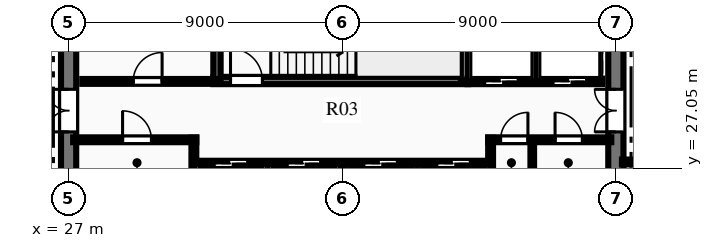
"""IFC4 building model, lengths in metres.
Left out: names, types, materials, properties, quantities, classifications, styles, units other than length and angle.
Written with IfcOpenShell. Run it as: python <this file> out.ifc"""

import sys

from ifc_helpers import new_model, si_unit, direction, frame, frame_2d, origin, place, context, subcontext, project, spatial, rectangle, extrude, element, fill, save


model = new_model("IFC4")
c1 = context("Model", 3, precision=1e-05, world=origin(), true_north=direction((0.0, 1.0)))
c2 = subcontext(c1, "Body", "Model", "MODEL_VIEW")
j1 = project(units=[si_unit("LENGTHUNIT", "METRE"), si_unit("PLANEANGLEUNIT", "RADIAN")], contexts=[c1])
p1 = place(None, origin())
s1 = spatial("IfcSite", under=j1, at=p1, CompositionType="ELEMENT")
p2 = place(p1, origin())
s2 = spatial("IfcBuilding", under=s1, at=p2, CompositionType="ELEMENT")
p3 = place(p2, frame((0.0, 0.0, 174.45)))
s3 = spatial("IfcBuildingStorey", under=s2, at=p3, CompositionType="ELEMENT", Elevation=174.45)
p4 = place(p3, frame((27.0, 18.25, 0.0), z_axis=(0.0, 0.0, 1.0), x_axis=(0.0, 1.0, 0.0)))
e1 = element("IfcWall", 1, at=p4, inside=s3, PredefinedType="SHEAR", context=c2, shape_type="SweptSolid", body=[
    extrude(rectangle(XDim=15.5, YDim=0.5, at=frame_2d((7.75, 0.0))), origin(), (0.0, 0.0, 1.0), 3.75),
])
p5 = place(p4, frame((9.99, 0.0, 0.0)))
e2 = element("IfcOpeningElement", 2, at=p5, cuts=e1, PredefinedType="OPENING", context=c2, shape_type="SweptSolid", body=[
    extrude(rectangle(XDim=1.4, YDim=2.2, at=frame_2d((0.7, 1.1))), frame((0.0, 0.26, 0.0), z_axis=(0.0, -1.0, 0.0), x_axis=(1.0, 0.0, 0.0)), (0.0, 0.0, 1.0), 0.52),
])
p6 = place(p3, frame((45.0, 18.25, 0.0), z_axis=(0.0, 0.0, 1.0), x_axis=(0.0, 1.0, 0.0)))
e3 = element("IfcWall", 3, at=p6, inside=s3, PredefinedType="SHEAR", context=c2, shape_type="SweptSolid", body=[
    extrude(rectangle(XDim=15.5, YDim=0.5, at=frame_2d((7.75, 0.0))), origin(), (0.0, 0.0, 1.0), 3.75),
])
p7 = place(p6, frame((9.99, 0.0, 0.0)))
e4 = element("IfcOpeningElement", 4, at=p7, cuts=e3, PredefinedType="OPENING", context=c2, shape_type="SweptSolid", body=[
    extrude(rectangle(XDim=1.4, YDim=2.2, at=frame_2d((0.7, 1.1))), frame((0.0, 0.26, 0.0), z_axis=(0.0, -1.0, 0.0), x_axis=(1.0, 0.0, 0.0)), (0.0, 0.0, 1.0), 0.52),
])
p8 = place(p3, frame((31.76, 29.93, 0.0), z_axis=(0.0, 0.0, 1.0), x_axis=(1.0, 0.0, 0.0)))
e5 = element("IfcWall", 5, at=p8, inside=s3, PredefinedType="SHEAR", context=c2, shape_type="SweptSolid", body=[
    extrude(rectangle(XDim=8.38, YDim=0.24, at=frame_2d((4.19, 0.0))), origin(), (0.0, 0.0, 1.0), 3.75),
])
p9 = place(p8, frame((0.565, 0.0, 0.0)))
e6 = element("IfcOpeningElement", 6, at=p9, cuts=e5, PredefinedType="OPENING", context=c2, shape_type="SweptSolid", body=[
    extrude(rectangle(XDim=1.05, YDim=2.15, at=frame_2d((0.525, 1.075))), frame((0.0, 0.13, 0.0), z_axis=(0.0, -1.0, 0.0), x_axis=(1.0, 0.0, 0.0)), (0.0, 0.0, 1.0), 0.26),
])
p10 = place(p3, frame((31.88, 29.93, 0.0), z_axis=(0.0, 0.0, 1.0), x_axis=(0.0, 1.0, 0.0)))
e7 = element("IfcWall", 7, at=p10, inside=s3, PredefinedType="SHEAR", context=c2, shape_type="SweptSolid", body=[
    extrude(rectangle(XDim=3.79, YDim=0.24, at=frame_2d((1.895, 0.0))), origin(), (0.0, 0.0, 1.0), 3.75),
])
p11 = place(p3, frame((40.02, 29.93, 0.0), z_axis=(0.0, 0.0, 1.0), x_axis=(0.0, 1.0, 0.0)))
e8 = element("IfcWall", 8, at=p11, inside=s3, PredefinedType="SHEAR", context=c2, shape_type="SweptSolid", body=[
    extrude(rectangle(XDim=3.85, YDim=0.24, at=frame_2d((1.925, 0.0))), origin(), (0.0, 0.0, 1.0), 3.75),
])
p12 = place(p3, frame((27.15, 27.98, 0.0), z_axis=(0.0, 0.0, 1.0), x_axis=(1.0, 0.0, 0.0)))
e9 = element("IfcWall", 9, at=p12, inside=s3, PredefinedType="PARTITIONING", context=c2, shape_type="SweptSolid", body=[
    extrude(rectangle(XDim=4.05, YDim=0.16, at=frame_2d((2.025, 0.0))), origin(), (0.0, 0.0, 1.0), 3.46),
])
p13 = place(p12, frame((1.625, 0.0, 0.0)))
e10 = element("IfcOpeningElement", 10, at=p13, cuts=e9, PredefinedType="OPENING", context=c2, shape_type="SweptSolid", body=[
    extrude(rectangle(XDim=0.95, YDim=2.15, at=frame_2d((0.475, 1.075))), frame((0.0, 0.09, 0.0), z_axis=(0.0, -1.0, 0.0), x_axis=(1.0, 0.0, 0.0)), (0.0, 0.0, 1.0), 0.18),
])
p14 = place(p3, frame((31.12, 26.54, 0.0), z_axis=(0.0, 0.0, 1.0), x_axis=(0.0, 1.0, 0.0)))
e11 = element("IfcWall", 11, at=p14, inside=s3, PredefinedType="PARTITIONING", context=c2, shape_type="SweptSolid", body=[
    extrude(rectangle(XDim=1.51, YDim=0.16, at=frame_2d((0.755, 0.0))), origin(), (0.0, 0.0, 1.0), 3.46),
])
p15 = place(p3, frame((40.8, 27.98, 0.0), z_axis=(0.0, 0.0, 1.0), x_axis=(1.0, 0.0, 0.0)))
e12 = element("IfcWall", 12, at=p15, inside=s3, PredefinedType="PARTITIONING", context=c2, shape_type="SweptSolid", body=[
    extrude(rectangle(XDim=4.05, YDim=0.16, at=frame_2d((2.025, 0.0))), origin(), (0.0, 0.0, 1.0), 3.46),
])
p16 = place(p15, frame((0.407, 0.0, 0.0)))
e13 = element("IfcOpeningElement", 13, at=p16, cuts=e12, PredefinedType="OPENING", context=c2, shape_type="SweptSolid", body=[
    extrude(rectangle(XDim=0.9, YDim=2.15, at=frame_2d((0.45, 1.075))), frame((0.0, 0.09, 0.0), z_axis=(0.0, -1.0, 0.0), x_axis=(1.0, 0.0, 0.0)), (0.0, 0.0, 1.0), 0.18),
])
p17 = place(p15, frame((2.2, 0.0, 0.0)))
e14 = element("IfcOpeningElement", 14, at=p17, cuts=e12, PredefinedType="OPENING", context=c2, shape_type="SweptSolid", body=[
    extrude(rectangle(XDim=0.9, YDim=2.15, at=frame_2d((0.45, 1.075))), frame((0.0, 0.09, 0.0), z_axis=(0.0, -1.0, 0.0), x_axis=(1.0, 0.0, 0.0)), (0.0, 0.0, 1.0), 0.18),
])
p18 = place(p3, frame((40.88, 26.54, 0.0), z_axis=(0.0, 0.0, 1.0), x_axis=(0.0, 1.0, 0.0)))
e15 = element("IfcWall", 15, at=p18, inside=s3, PredefinedType="PARTITIONING", context=c2, shape_type="SweptSolid", body=[
    extrude(rectangle(XDim=1.51, YDim=0.16, at=frame_2d((0.755, 0.0))), origin(), (0.0, 0.0, 1.0), 3.46),
])
p19 = place(p3, frame((42.25, 26.54, 0.0), z_axis=(0.0, 0.0, 1.0), x_axis=(0.0, 1.0, 0.0)))
e16 = element("IfcWall", 16, at=p19, inside=s3, PredefinedType="PARTITIONING", context=c2, shape_type="SweptSolid", body=[
    extrude(rectangle(XDim=1.44, YDim=0.12, at=frame_2d((0.72, 0.0))), origin(), (0.0, 0.0, 1.0), 3.46),
])
p20 = place(p3, frame((27.45, 29.9, 0.0), z_axis=(0.0, 0.0, 1.0), x_axis=(1.0, 0.0, 0.0)))
e17 = element("IfcWall", 17, at=p20, inside=s3, PredefinedType="PARTITIONING", context=c2, shape_type="SweptSolid", body=[
    extrude(rectangle(XDim=4.43, YDim=0.16, at=frame_2d((2.215, 0.0))), origin(), (0.0, 0.0, 1.0), 3.46),
])
p21 = place(p20, frame((1.675, 0.0, 0.0)))
e18 = element("IfcOpeningElement", 18, at=p21, cuts=e17, PredefinedType="OPENING", context=c2, shape_type="SweptSolid", body=[
    extrude(rectangle(XDim=0.95, YDim=2.15, at=frame_2d((0.475, 1.075))), frame((0.0, 0.09, 0.0), z_axis=(0.0, -1.0, 0.0), x_axis=(1.0, 0.0, 0.0)), (0.0, 0.0, 1.0), 0.18),
])
p22 = place(p3, frame((40.12, 29.9, 0.0), z_axis=(0.0, 0.0, 1.0), x_axis=(1.0, 0.0, 0.0)))
e19 = element("IfcWall", 19, at=p22, inside=s3, PredefinedType="PARTITIONING", context=c2, shape_type="SweptSolid", body=[
    extrude(rectangle(XDim=4.43, YDim=0.18, at=frame_2d((2.215, 0.0))), origin(), (0.0, 0.0, 1.0), 3.46),
])
p23 = place(p22, frame((0.565, 0.0, 0.0)))
e20 = element("IfcOpeningElement", 20, at=p23, cuts=e19, PredefinedType="OPENING", context=c2, shape_type="SweptSolid", body=[
    extrude(rectangle(XDim=1.1, YDim=2.15, at=frame_2d((0.55, 1.075))), frame((0.0, 0.1, 0.0), z_axis=(0.0, -1.0, 0.0), x_axis=(1.0, 0.0, 0.0)), (0.0, 0.0, 1.0), 0.2),
])
p24 = place(p22, frame((2.815, 0.0, 0.0)))
e21 = element("IfcOpeningElement", 21, at=p24, cuts=e19, PredefinedType="OPENING", context=c2, shape_type="SweptSolid", body=[
    extrude(rectangle(XDim=1.1, YDim=2.15, at=frame_2d((0.55, 1.075))), frame((0.0, 0.1, 0.0), z_axis=(0.0, -1.0, 0.0), x_axis=(1.0, 0.0, 0.0)), (0.0, 0.0, 1.0), 0.2),
])
p25 = place(p3, frame((42.37, 29.9, 0.0), z_axis=(0.0, 0.0, 1.0), x_axis=(0.0, 1.0, 0.0)))
e22 = element("IfcWall", 22, at=p25, inside=s3, PredefinedType="PARTITIONING", context=c2, shape_type="SweptSolid", body=[
    extrude(rectangle(XDim=3.75, YDim=0.18, at=frame_2d((1.875, 0.0))), origin(), (0.0, 0.0, 1.0), 3.46),
])
p26 = place(p3, frame((31.2, 27.2, 0.0), z_axis=(0.0, 0.0, 1.0), x_axis=(1.0, 0.0, 0.0)))
e23 = element("IfcWall", 23, at=p26, inside=s3, PredefinedType="PARTITIONING", context=c2, shape_type="SweptSolid", body=[
    extrude(rectangle(XDim=9.6, YDim=0.18, at=frame_2d((4.8, 0.0))), origin(), (0.0, 0.0, 1.0), 3.46),
])
p27 = place(p26, frame((0.59, 0.0, 0.0)))
e24 = element("IfcOpeningElement", 24, at=p27, cuts=e23, PredefinedType="OPENING", context=c2, shape_type="SweptSolid", body=[
    extrude(rectangle(XDim=1.1, YDim=2.15, at=frame_2d((0.55, 1.075))), frame((0.0, 0.1, 0.0), z_axis=(0.0, -1.0, 0.0), x_axis=(1.0, 0.0, 0.0)), (0.0, 0.0, 1.0), 0.2),
])
p28 = place(p26, frame((2.99, 0.0, 0.0)))
e25 = element("IfcOpeningElement", 25, at=p28, cuts=e23, PredefinedType="OPENING", context=c2, shape_type="SweptSolid", body=[
    extrude(rectangle(XDim=1.1, YDim=2.15, at=frame_2d((0.55, 1.075))), frame((0.0, 0.1, 0.0), z_axis=(0.0, -1.0, 0.0), x_axis=(1.0, 0.0, 0.0)), (0.0, 0.0, 1.0), 0.2),
])
p29 = place(p26, frame((5.51, 0.0, 0.0)))
e26 = element("IfcOpeningElement", 26, at=p29, cuts=e23, PredefinedType="OPENING", context=c2, shape_type="SweptSolid", body=[
    extrude(rectangle(XDim=1.1, YDim=2.15, at=frame_2d((0.55, 1.075))), frame((0.0, 0.1, 0.0), z_axis=(0.0, -1.0, 0.0), x_axis=(1.0, 0.0, 0.0)), (0.0, 0.0, 1.0), 0.2),
])
p30 = place(p26, frame((7.91, 0.0, 0.0)))
e27 = element("IfcOpeningElement", 27, at=p30, cuts=e23, PredefinedType="OPENING", context=c2, shape_type="SweptSolid", body=[
    extrude(rectangle(XDim=1.1, YDim=2.15, at=frame_2d((0.55, 1.075))), frame((0.0, 0.1, 0.0), z_axis=(0.0, -1.0, 0.0), x_axis=(1.0, 0.0, 0.0)), (0.0, 0.0, 1.0), 0.2),
])
for number, where, z_axis, x_axis in (
    (28, (33.54, 25.3, 0.0), (0.0, 0.0, 1.0), (0.0, 1.0, 0.0)),
    (29, (36.0, 25.3, 0.0), (0.0, 0.0, 1.0), (0.0, 1.0, 0.0)),
    (30, (38.46, 25.3, 0.0), (0.0, 0.0, 1.0), (0.0, 1.0, 0.0)),
):
    element("IfcWall", number, at=place(p3, frame(where, z_axis=z_axis, x_axis=x_axis)), inside=s3, PredefinedType="PARTITIONING", context=c2, shape_type="SweptSolid", body=[
        extrude(rectangle(XDim=1.9, YDim=0.18, at=frame_2d((0.95, 0.0))), origin(), (0.0, 0.0, 1.0), 3.46),
    ])
p31 = place(p3, frame((45.2, 27.25, 0.0), z_axis=(0.0, 0.0, 1.0), x_axis=(1.0, 0.0, 0.0)))
e31 = element("IfcWall", 31, at=p31, inside=s3, PredefinedType="PARTITIONING", context=c2, shape_type="SweptSolid", body=[
    extrude(rectangle(XDim=2.25, YDim=0.16, at=frame_2d((1.125, 0.0))), origin(), (0.0, 0.0, 1.0), 3.46),
])
p32 = place(p13, origin())
e32 = element("IfcDoor", 32, at=p32, inside=s3, OperationType="SINGLE_SWING_LEFT", PredefinedType="DOOR", context=c2, shape_type="SweptSolid", body=[
    extrude(rectangle(XDim=0.95, YDim=2.15, at=frame_2d((0.475, 1.075))), frame((0.0, 0.025, 0.0), z_axis=(0.0, -1.0, 0.0), x_axis=(1.0, 0.0, 0.0)), (0.0, 0.0, 1.0), 0.05),
])
fill(e10, e32)
p33 = place(p16, origin())
e33 = element("IfcDoor", 33, at=p33, inside=s3, OperationType="SINGLE_SWING_RIGHT", PredefinedType="DOOR", context=c2, shape_type="SweptSolid", body=[
    extrude(rectangle(XDim=0.9, YDim=2.15, at=frame_2d((0.45, 1.075))), frame((0.0, 0.025, 0.0), z_axis=(0.0, -1.0, 0.0), x_axis=(1.0, 0.0, 0.0)), (0.0, 0.0, 1.0), 0.05),
])
fill(e13, e33)
p34 = place(p17, origin())
e34 = element("IfcDoor", 34, at=p34, inside=s3, OperationType="SINGLE_SWING_LEFT", PredefinedType="DOOR", context=c2, shape_type="SweptSolid", body=[
    extrude(rectangle(XDim=0.9, YDim=2.15, at=frame_2d((0.45, 1.075))), frame((0.0, 0.025, 0.0), z_axis=(0.0, -1.0, 0.0), x_axis=(1.0, 0.0, 0.0)), (0.0, 0.0, 1.0), 0.05),
])
fill(e14, e34)
p35 = place(p21, origin())
e35 = element("IfcDoor", 35, at=p35, inside=s3, OperationType="SINGLE_SWING_RIGHT", PredefinedType="DOOR", context=c2, shape_type="SweptSolid", body=[
    extrude(rectangle(XDim=0.95, YDim=2.15, at=frame_2d((0.475, 1.075))), frame((0.0, 0.025, 0.0), z_axis=(0.0, -1.0, 0.0), x_axis=(1.0, 0.0, 0.0)), (0.0, 0.0, 1.0), 0.05),
])
fill(e18, e35)
p36 = place(p9, origin())
e36 = element("IfcDoor", 36, at=p36, inside=s3, OperationType="SINGLE_SWING_LEFT", PredefinedType="DOOR", context=c2, shape_type="SweptSolid", body=[
    extrude(rectangle(XDim=1.05, YDim=2.15, at=frame_2d((0.525, 1.075))), frame((0.0, 0.025, 0.0), z_axis=(0.0, -1.0, 0.0), x_axis=(1.0, 0.0, 0.0)), (0.0, 0.0, 1.0), 0.05),
])
fill(e6, e36)
p37 = place(p5, origin())
e37 = element("IfcDoor", 37, at=p37, inside=s3, OperationType="DOUBLE_DOOR_SINGLE_SWING", PredefinedType="DOOR", context=c2, shape_type="SweptSolid", body=[
    extrude(rectangle(XDim=1.4, YDim=2.2, at=frame_2d((0.7, 1.1))), frame((0.0, 0.025, 0.0), z_axis=(0.0, -1.0, 0.0), x_axis=(1.0, 0.0, 0.0)), (0.0, 0.0, 1.0), 0.05),
])
fill(e2, e37)
p38 = place(p7, origin())
e38 = element("IfcDoor", 38, at=p38, inside=s3, OperationType="DOUBLE_DOOR_SINGLE_SWING", PredefinedType="DOOR", context=c2, shape_type="SweptSolid", body=[
    extrude(rectangle(XDim=1.4, YDim=2.2, at=frame_2d((0.7, 1.1))), frame((0.0, 0.025, 0.0), z_axis=(0.0, -1.0, 0.0), x_axis=(1.0, 0.0, 0.0)), (0.0, 0.0, 1.0), 0.05),
])
fill(e4, e38)
p39 = place(p23, origin())
e39 = element("IfcDoor", 39, at=p39, inside=s3, OperationType="SLIDING_TO_LEFT", PredefinedType="DOOR", context=c2, shape_type="SweptSolid", body=[
    extrude(rectangle(XDim=1.1, YDim=2.15, at=frame_2d((0.55, 1.075))), frame((0.0, 0.025, 0.0), z_axis=(0.0, -1.0, 0.0), x_axis=(1.0, 0.0, 0.0)), (0.0, 0.0, 1.0), 0.05),
])
fill(e20, e39)
p40 = place(p24, origin())
e40 = element("IfcDoor", 40, at=p40, inside=s3, OperationType="SLIDING_TO_LEFT", PredefinedType="DOOR", context=c2, shape_type="SweptSolid", body=[
    extrude(rectangle(XDim=1.1, YDim=2.15, at=frame_2d((0.55, 1.075))), frame((0.0, 0.025, 0.0), z_axis=(0.0, -1.0, 0.0), x_axis=(1.0, 0.0, 0.0)), (0.0, 0.0, 1.0), 0.05),
])
fill(e21, e40)
p41 = place(p27, origin())
e41 = element("IfcDoor", 41, at=p41, inside=s3, OperationType="SLIDING_TO_LEFT", PredefinedType="DOOR", context=c2, shape_type="SweptSolid", body=[
    extrude(rectangle(XDim=1.1, YDim=2.15, at=frame_2d((0.55, 1.075))), frame((0.0, 0.025, 0.0), z_axis=(0.0, -1.0, 0.0), x_axis=(1.0, 0.0, 0.0)), (0.0, 0.0, 1.0), 0.05),
])
fill(e24, e41)
p42 = place(p28, origin())
e42 = element("IfcDoor", 42, at=p42, inside=s3, OperationType="SLIDING_TO_LEFT", PredefinedType="DOOR", context=c2, shape_type="SweptSolid", body=[
    extrude(rectangle(XDim=1.1, YDim=2.15, at=frame_2d((0.55, 1.075))), frame((0.0, 0.025, 0.0), z_axis=(0.0, -1.0, 0.0), x_axis=(1.0, 0.0, 0.0)), (0.0, 0.0, 1.0), 0.05),
])
fill(e25, e42)
p43 = place(p29, origin())
e43 = element("IfcDoor", 43, at=p43, inside=s3, OperationType="SLIDING_TO_LEFT", PredefinedType="DOOR", context=c2, shape_type="SweptSolid", body=[
    extrude(rectangle(XDim=1.1, YDim=2.15, at=frame_2d((0.55, 1.075))), frame((0.0, 0.025, 0.0), z_axis=(0.0, -1.0, 0.0), x_axis=(1.0, 0.0, 0.0)), (0.0, 0.0, 1.0), 0.05),
])
fill(e26, e43)
p44 = place(p30, origin())
e44 = element("IfcDoor", 44, at=p44, inside=s3, OperationType="SLIDING_TO_LEFT", PredefinedType="DOOR", context=c2, shape_type="SweptSolid", body=[
    extrude(rectangle(XDim=1.1, YDim=2.15, at=frame_2d((0.55, 1.075))), frame((0.0, 0.025, 0.0), z_axis=(0.0, -1.0, 0.0), x_axis=(1.0, 0.0, 0.0)), (0.0, 0.0, 1.0), 0.05),
])
fill(e27, e44)
save(model, sys.argv[1])
